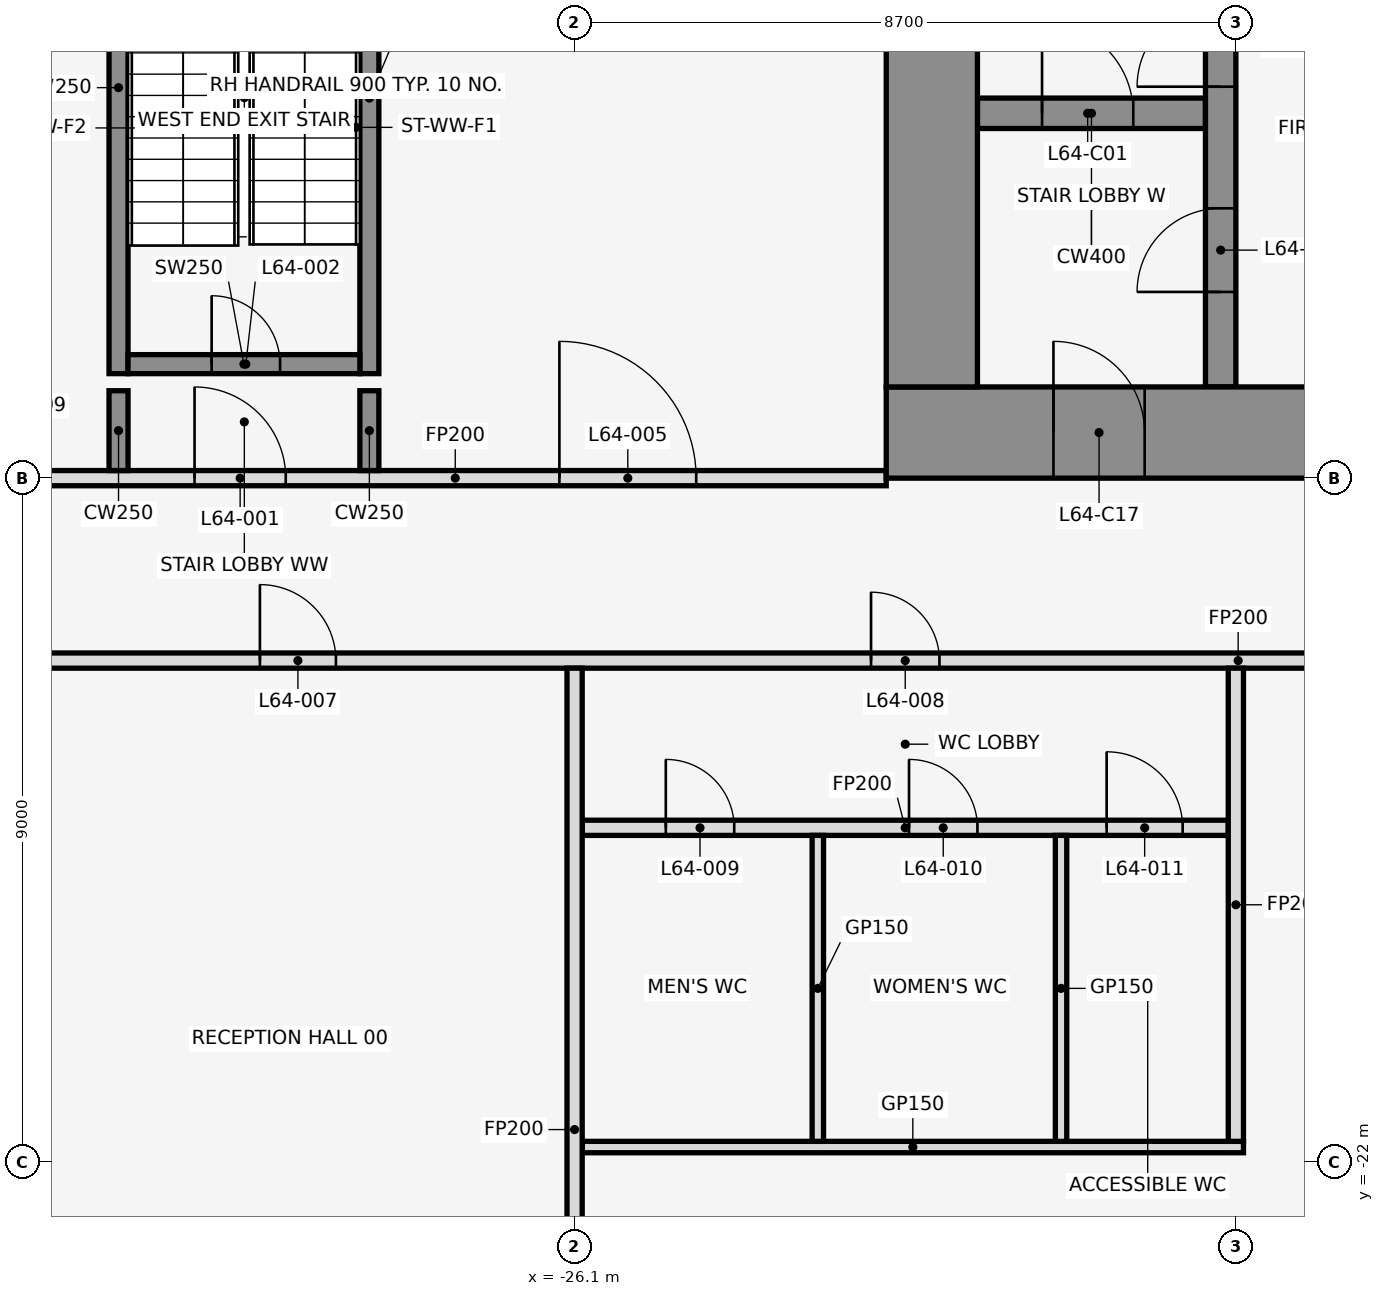
"""IFC4 building model, lengths in metres.
Left out: names, types, materials, properties, quantities, classifications, styles, units other than length and angle.
Written with IfcOpenShell. Run it as: python <this file> out.ifc"""

import sys

from ifc_helpers import new_model, si_unit, direction, frame, frame_2d, origin, place, context, subcontext, project, spatial, rectangle, extrude, element, fill, save


model = new_model("IFC4")
c1 = context("Model", 3, precision=1e-05, world=origin(), true_north=direction((0.0, 1.0)))
c2 = subcontext(c1, "Body", "Model", "MODEL_VIEW")
j1 = project(units=[si_unit("LENGTHUNIT", "METRE"), si_unit("PLANEANGLEUNIT", "RADIAN")], contexts=[c1])
p1 = place(None, origin())
s1 = spatial("IfcSite", under=j1, at=p1, CompositionType="ELEMENT")
p2 = place(p1, origin())
s2 = spatial("IfcBuilding", under=s1, at=p2, CompositionType="ELEMENT")
p3 = place(p2, frame((0.0, 0.0, 283.4)))
s3 = spatial("IfcBuildingStorey", under=s2, at=p3, CompositionType="ELEMENT", Elevation=283.4)
p4 = place(p3, frame((-32.1, -11.625, 0.0), z_axis=(0.0, 0.0, 1.0), x_axis=(0.0, 1.0, 0.0)))
e1 = element("IfcWall", 1, at=p4, inside=s3, PredefinedType="SHEAR", context=c2, shape_type="SweptSolid", body=[
    extrude(rectangle(XDim=7.525, YDim=0.25, at=frame_2d((3.762, 0.0))), origin(), (0.0, 0.0, 1.0), 4.2),
])
p5 = place(p3, frame((-28.8, -11.625, 0.0), z_axis=(0.0, 0.0, 1.0), x_axis=(0.0, 1.0, 0.0)))
e2 = element("IfcWall", 2, at=p5, inside=s3, PredefinedType="SHEAR", context=c2, shape_type="SweptSolid", body=[
    extrude(rectangle(XDim=7.25, YDim=0.25, at=frame_2d((3.625, 0.0))), origin(), (0.0, 0.0, 1.0), 4.2),
])
p6 = place(p3, frame((-31.975, -11.5, 0.0), z_axis=(0.0, 0.0, 1.0), x_axis=(1.0, 0.0, 0.0)))
e3 = element("IfcWall", 3, at=p6, inside=s3, PredefinedType="SHEAR", context=c2, shape_type="SweptSolid", body=[
    extrude(rectangle(XDim=3.05, YDim=0.25, at=frame_2d((1.525, 0.0))), origin(), (0.0, 0.0, 1.0), 4.2),
])
p7 = place(p6, frame((1.1, 0.0, 0.0)))
e4 = element("IfcOpeningElement", 4, at=p7, cuts=e3, PredefinedType="OPENING", context=c2, shape_type="SweptSolid", body=[
    extrude(rectangle(XDim=0.9, YDim=2.1, at=frame_2d((0.45, 1.05))), frame((0.0, 0.137, 0.0), z_axis=(0.0, -1.0, 0.0), x_axis=(1.0, 0.0, 0.0)), (0.0, 0.0, 1.0), 0.274),
])
p8 = place(p3, frame((-26.0, -21.8, 0.0), z_axis=(0.0, 0.0, 1.0), x_axis=(1.0, 0.0, 0.0)))
e5 = element("IfcWall", 5, at=p8, inside=s3, PredefinedType="PARTITIONING", context=c2, shape_type="SweptSolid", body=[
    extrude(rectangle(XDim=8.7, YDim=0.15, at=frame_2d((4.35, 0.0))), origin(), (0.0, 0.0, 1.0), 3.068),
])
p9 = place(p3, frame((-26.0, -17.6, 0.0), z_axis=(0.0, 0.0, 1.0), x_axis=(1.0, 0.0, 0.0)))
e6 = element("IfcWall", 6, at=p9, inside=s3, PredefinedType="PARTITIONING", context=c2, shape_type="SweptSolid", body=[
    extrude(rectangle(XDim=8.5, YDim=0.2, at=frame_2d((4.25, 0.0))), origin(), (0.0, 0.0, 1.0), 3.068),
])
p10 = place(p9, frame((1.1, 0.0, 0.0)))
e7 = element("IfcOpeningElement", 7, at=p10, cuts=e6, PredefinedType="OPENING", context=c2, shape_type="SweptSolid", body=[
    extrude(rectangle(XDim=0.9, YDim=2.1, at=frame_2d((0.45, 1.05))), frame((0.0, 0.112, 0.0), z_axis=(0.0, -1.0, 0.0), x_axis=(1.0, 0.0, 0.0)), (0.0, 0.0, 1.0), 0.224),
])
p11 = place(p9, frame((4.3, 0.0, 0.0)))
e8 = element("IfcOpeningElement", 8, at=p11, cuts=e6, PredefinedType="OPENING", context=c2, shape_type="SweptSolid", body=[
    extrude(rectangle(XDim=0.9, YDim=2.1, at=frame_2d((0.45, 1.05))), frame((0.0, 0.112, 0.0), z_axis=(0.0, -1.0, 0.0), x_axis=(1.0, 0.0, 0.0)), (0.0, 0.0, 1.0), 0.224),
])
p12 = place(p9, frame((6.9, 0.0, 0.0)))
e9 = element("IfcOpeningElement", 9, at=p12, cuts=e6, PredefinedType="OPENING", context=c2, shape_type="SweptSolid", body=[
    extrude(rectangle(XDim=1.0, YDim=2.1, at=frame_2d((0.5, 1.05))), frame((0.0, 0.112, 0.0), z_axis=(0.0, -1.0, 0.0), x_axis=(1.0, 0.0, 0.0)), (0.0, 0.0, 1.0), 0.224),
])
p13 = place(p3, frame((-33.34, -15.4, 0.0), z_axis=(0.0, 0.0, 1.0), x_axis=(1.0, 0.0, 0.0)))
e10 = element("IfcWall", 10, at=p13, inside=s3, PredefinedType="PARTITIONING", context=c2, shape_type="SweptSolid", body=[
    extrude(rectangle(XDim=31.94, YDim=0.2, at=frame_2d((15.97, 0.0))), origin(), (0.0, 0.0, 1.0), 3.068),
])
p14 = place(p13, frame((3.1, 0.0, 0.0)))
e11 = element("IfcOpeningElement", 11, at=p14, cuts=e10, PredefinedType="OPENING", context=c2, shape_type="SweptSolid", body=[
    extrude(rectangle(XDim=1.0, YDim=2.1, at=frame_2d((0.5, 1.05))), frame((0.0, 0.112, 0.0), z_axis=(0.0, -1.0, 0.0), x_axis=(1.0, 0.0, 0.0)), (0.0, 0.0, 1.0), 0.224),
])
p15 = place(p13, frame((11.14, 0.0, 0.0)))
e12 = element("IfcOpeningElement", 12, at=p15, cuts=e10, PredefinedType="OPENING", context=c2, shape_type="SweptSolid", body=[
    extrude(rectangle(XDim=0.9, YDim=2.1, at=frame_2d((0.45, 1.05))), frame((0.0, 0.112, 0.0), z_axis=(0.0, -1.0, 0.0), x_axis=(1.0, 0.0, 0.0)), (0.0, 0.0, 1.0), 0.224),
])
p16 = place(p13, frame((20.84, 0.0, 0.0)))
e13 = element("IfcOpeningElement", 13, at=p16, cuts=e10, PredefinedType="OPENING", context=c2, shape_type="SweptSolid", body=[
    extrude(rectangle(XDim=1.8, YDim=2.1, at=frame_2d((0.9, 1.05))), frame((0.0, 0.112, 0.0), z_axis=(0.0, -1.0, 0.0), x_axis=(1.0, 0.0, 0.0)), (0.0, 0.0, 1.0), 0.224),
])
p17 = place(p3, frame((-33.34, -13.0, 0.0), z_axis=(0.0, 0.0, 1.0), x_axis=(1.0, 0.0, 0.0)))
e14 = element("IfcWall", 14, at=p17, inside=s3, PredefinedType="PARTITIONING", context=c2, shape_type="SweptSolid", body=[
    extrude(rectangle(XDim=11.34, YDim=0.2, at=frame_2d((5.67, 0.0))), origin(), (0.0, 0.0, 1.0), 3.068),
])
p18 = place(p17, frame((2.24, 0.0, 0.0)))
e15 = element("IfcOpeningElement", 15, at=p18, cuts=e14, PredefinedType="OPENING", context=c2, shape_type="SweptSolid", body=[
    extrude(rectangle(XDim=1.2, YDim=2.1, at=frame_2d((0.6, 1.05))), frame((0.0, 0.112, 0.0), z_axis=(0.0, -1.0, 0.0), x_axis=(1.0, 0.0, 0.0)), (0.0, 0.0, 1.0), 0.224),
])
p19 = place(p17, frame((7.04, 0.0, 0.0)))
e16 = element("IfcOpeningElement", 16, at=p19, cuts=e14, PredefinedType="OPENING", context=c2, shape_type="SweptSolid", body=[
    extrude(rectangle(XDim=1.8, YDim=2.1, at=frame_2d((0.9, 1.05))), frame((0.0, 0.112, 0.0), z_axis=(0.0, -1.0, 0.0), x_axis=(1.0, 0.0, 0.0)), (0.0, 0.0, 1.0), 0.224),
])
for number, where, z_axis, x_axis in (
    (17, (-32.1, -12.9, 0.0), (0.0, 0.0, 1.0), (0.0, 1.0, 0.0)),
    (18, (-28.8, -12.9, 0.0), (0.0, 0.0, 1.0), (0.0, 1.0, 0.0)),
):
    element("IfcWall", number, at=place(p3, frame(where, z_axis=z_axis, x_axis=x_axis)), inside=s3, PredefinedType="SHEAR", context=c2, shape_type="SweptSolid", body=[
        extrude(rectangle(XDim=1.05, YDim=0.25, at=frame_2d((0.525, 0.0))), origin(), (0.0, 0.0, 1.0), 4.2),
    ])
p20 = place(p3, frame((-26.1, -27.64, 0.0), z_axis=(0.0, 0.0, 1.0), x_axis=(0.0, 1.0, 0.0)))
e19 = element("IfcWall", 19, at=p20, inside=s3, PredefinedType="PARTITIONING", context=c2, shape_type="SweptSolid", body=[
    extrude(rectangle(XDim=12.14, YDim=0.2, at=frame_2d((6.07, 0.0))), origin(), (0.0, 0.0, 1.0), 3.068),
])
for number, where, z_axis, x_axis in (
    (20, (-22.9, -21.725, 0.0), (0.0, 0.0, 1.0), (0.0, 1.0, 0.0)),
    (21, (-19.7, -21.725, 0.0), (0.0, 0.0, 1.0), (0.0, 1.0, 0.0)),
):
    element("IfcWall", number, at=place(p3, frame(where, z_axis=z_axis, x_axis=x_axis)), inside=s3, PredefinedType="PARTITIONING", context=c2, shape_type="SweptSolid", body=[
        extrude(rectangle(XDim=4.025, YDim=0.15, at=frame_2d((2.013, 0.0))), origin(), (0.0, 0.0, 1.0), 3.068),
    ])
p21 = place(p3, frame((-17.4, -21.725, 0.0), z_axis=(0.0, 0.0, 1.0), x_axis=(0.0, 1.0, 0.0)))
e22 = element("IfcWall", 22, at=p21, inside=s3, PredefinedType="PARTITIONING", context=c2, shape_type="SweptSolid", body=[
    extrude(rectangle(XDim=6.225, YDim=0.2, at=frame_2d((3.113, 0.0))), origin(), (0.0, 0.0, 1.0), 3.068),
])
p22 = place(p3, frame((-20.8, -8.2, 0.0), z_axis=(0.0, 0.0, 1.0), x_axis=(1.0, 0.0, 0.0)))
e23 = element("IfcWall", 23, at=p22, inside=s3, PredefinedType="SHEAR", context=c2, shape_type="SweptSolid", body=[
    extrude(rectangle(XDim=3.0, YDim=0.4, at=frame_2d((1.5, 0.0))), origin(), (0.0, 0.0, 1.0), 4.2),
])
p23 = place(p22, frame((0.85, 0.0, 0.0)))
e24 = element("IfcOpeningElement", 24, at=p23, cuts=e23, PredefinedType="OPENING", context=c2, shape_type="SweptSolid", body=[
    extrude(rectangle(XDim=1.2, YDim=2.1, at=frame_2d((0.6, 1.05))), frame((0.0, 0.212, 0.0), z_axis=(0.0, -1.0, 0.0), x_axis=(1.0, 0.0, 0.0)), (0.0, 0.0, 1.0), 0.424),
])
p24 = place(p3, frame((-17.6, -11.8, 0.0), z_axis=(0.0, 0.0, 1.0), x_axis=(0.0, 1.0, 0.0)))
e25 = element("IfcWall", 25, at=p24, inside=s3, PredefinedType="SHEAR", context=c2, shape_type="SweptSolid", body=[
    extrude(rectangle(XDim=10.6, YDim=0.4, at=frame_2d((5.3, 0.0))), origin(), (0.0, 0.0, 1.0), 4.2),
])
p25 = place(p24, frame((1.25, 0.0, 0.0)))
e26 = element("IfcOpeningElement", 26, at=p25, cuts=e25, PredefinedType="OPENING", context=c2, shape_type="SweptSolid", body=[
    extrude(rectangle(XDim=1.1, YDim=2.1, at=frame_2d((0.55, 1.05))), frame((0.0, 0.212, 0.0), z_axis=(0.0, -1.0, 0.0), x_axis=(1.0, 0.0, 0.0)), (0.0, 0.0, 1.0), 0.424),
])
p26 = place(p24, frame((3.95, 0.0, 0.0)))
e27 = element("IfcOpeningElement", 27, at=p26, cuts=e25, PredefinedType="OPENING", context=c2, shape_type="SweptSolid", body=[
    extrude(rectangle(XDim=1.1, YDim=2.1, at=frame_2d((0.55, 1.05))), frame((0.0, 0.212, 0.0), z_axis=(0.0, -1.0, 0.0), x_axis=(1.0, 0.0, 0.0)), (0.0, 0.0, 1.0), 0.424),
])
p27 = place(p3, frame((-22.0, -12.4, 0.0), z_axis=(0.0, 0.0, 1.0), x_axis=(1.0, 0.0, 0.0)))
e28 = element("IfcWall", 28, at=p27, inside=s3, PredefinedType="SHEAR", context=c2, shape_type="SweptSolid", body=[
    extrude(rectangle(XDim=44.0, YDim=1.2, at=frame_2d((22.0, 0.0))), origin(), (0.0, 0.0, 1.0), 4.2),
])
p28 = place(p27, frame((2.2, 0.0, 0.0)))
e29 = element("IfcOpeningElement", 29, at=p28, cuts=e28, PredefinedType="OPENING", context=c2, shape_type="SweptSolid", body=[
    extrude(rectangle(XDim=1.2, YDim=2.1, at=frame_2d((0.6, 1.05))), frame((0.0, 0.612, 0.0), z_axis=(0.0, -1.0, 0.0), x_axis=(1.0, 0.0, 0.0)), (0.0, 0.0, 1.0), 1.224),
])
p29 = place(p27, frame((21.4, 0.0, 0.0)))
e30 = element("IfcOpeningElement", 30, at=p29, cuts=e28, PredefinedType="OPENING", context=c2, shape_type="SweptSolid", body=[
    extrude(rectangle(XDim=1.2, YDim=2.1, at=frame_2d((0.6, 1.05))), frame((0.0, 0.612, 0.0), z_axis=(0.0, -1.0, 0.0), x_axis=(1.0, 0.0, 0.0)), (0.0, 0.0, 1.0), 1.224),
])
p30 = place(p27, frame((40.6, 0.0, 0.0)))
e31 = element("IfcOpeningElement", 31, at=p30, cuts=e28, PredefinedType="OPENING", context=c2, shape_type="SweptSolid", body=[
    extrude(rectangle(XDim=1.2, YDim=2.1, at=frame_2d((0.6, 1.05))), frame((0.0, 0.612, 0.0), z_axis=(0.0, -1.0, 0.0), x_axis=(1.0, 0.0, 0.0)), (0.0, 0.0, 1.0), 1.224),
])
p31 = place(p27, frame((16.0, 0.0, 0.0)))
e32 = element("IfcOpeningElement", 32, at=p31, cuts=e28, PredefinedType="OPENING", context=c2, shape_type="SweptSolid", body=[
    extrude(rectangle(XDim=1.8, YDim=2.1, at=frame_2d((0.9, 1.05))), frame((0.0, 0.612, 0.0), z_axis=(0.0, -1.0, 0.0), x_axis=(1.0, 0.0, 0.0)), (0.0, 0.0, 1.0), 1.224),
])
p32 = place(p27, frame((6.3, 0.0, 0.0)))
e33 = element("IfcOpeningElement", 33, at=p32, cuts=e28, PredefinedType="OPENING", context=c2, shape_type="SweptSolid", body=[
    extrude(rectangle(XDim=1.2, YDim=2.1, at=frame_2d((0.6, 1.05))), frame((0.0, 0.612, 0.0), z_axis=(0.0, -1.0, 0.0), x_axis=(1.0, 0.0, 0.0)), (0.0, 0.0, 1.0), 1.224),
])
p33 = place(p27, frame((26.2, 0.0, 0.0)))
e34 = element("IfcOpeningElement", 34, at=p33, cuts=e28, PredefinedType="OPENING", context=c2, shape_type="SweptSolid", body=[
    extrude(rectangle(XDim=1.8, YDim=2.1, at=frame_2d((0.9, 1.05))), frame((0.0, 0.612, 0.0), z_axis=(0.0, -1.0, 0.0), x_axis=(1.0, 0.0, 0.0)), (0.0, 0.0, 1.0), 1.224),
])
p34 = place(p27, frame((36.5, 0.0, 0.0)))
e35 = element("IfcOpeningElement", 35, at=p34, cuts=e28, PredefinedType="OPENING", context=c2, shape_type="SweptSolid", body=[
    extrude(rectangle(XDim=1.2, YDim=2.1, at=frame_2d((0.6, 1.05))), frame((0.0, 0.612, 0.0), z_axis=(0.0, -1.0, 0.0), x_axis=(1.0, 0.0, 0.0)), (0.0, 0.0, 1.0), 1.224),
])
p35 = place(p3, frame((-21.4, -11.8, 0.0), z_axis=(0.0, 0.0, 1.0), x_axis=(0.0, 1.0, 0.0)))
e36 = element("IfcWall", 36, at=p35, inside=s3, PredefinedType="SHEAR", context=c2, shape_type="SweptSolid", body=[
    extrude(rectangle(XDim=10.6, YDim=1.2, at=frame_2d((5.3, 0.0))), origin(), (0.0, 0.0, 1.0), 4.2),
])
p36 = place(p18, origin())
e37 = element("IfcDoor", 37, at=p36, inside=s3, OperationType="SINGLE_SWING_LEFT", PredefinedType="DOOR", context=c2, shape_type="SweptSolid", body=[
    extrude(rectangle(XDim=1.2, YDim=2.1, at=frame_2d((0.6, 1.05))), frame((0.0, 0.025, 0.0), z_axis=(0.0, -1.0, 0.0), x_axis=(1.0, 0.0, 0.0)), (0.0, 0.0, 1.0), 0.05),
])
fill(e15, e37)
p37 = place(p7, origin())
e38 = element("IfcDoor", 38, at=p37, inside=s3, OperationType="SINGLE_SWING_LEFT", PredefinedType="DOOR", context=c2, shape_type="SweptSolid", body=[
    extrude(rectangle(XDim=0.9, YDim=2.1, at=frame_2d((0.45, 1.05))), frame((0.0, 0.025, 0.0), z_axis=(0.0, -1.0, 0.0), x_axis=(1.0, 0.0, 0.0)), (0.0, 0.0, 1.0), 0.05),
])
fill(e4, e38)
p38 = place(p19, origin())
e39 = element("IfcDoor", 39, at=p38, inside=s3, OperationType="SINGLE_SWING_LEFT", PredefinedType="DOOR", context=c2, shape_type="SweptSolid", body=[
    extrude(rectangle(XDim=1.8, YDim=2.1, at=frame_2d((0.9, 1.05))), frame((0.0, 0.025, 0.0), z_axis=(0.0, -1.0, 0.0), x_axis=(1.0, 0.0, 0.0)), (0.0, 0.0, 1.0), 0.05),
])
fill(e16, e39)
p39 = place(p14, frame((1.0, 0.0, 0.0), z_axis=(0.0, 0.0, 1.0), x_axis=(-1.0, 0.0, 0.0)))
e40 = element("IfcDoor", 40, at=p39, inside=s3, OperationType="SINGLE_SWING_LEFT", PredefinedType="DOOR", context=c2, shape_type="SweptSolid", body=[
    extrude(rectangle(XDim=1.0, YDim=2.1, at=frame_2d((0.5, 1.05))), frame((0.0, 0.025, 0.0), z_axis=(0.0, -1.0, 0.0), x_axis=(1.0, 0.0, 0.0)), (0.0, 0.0, 1.0), 0.05),
])
fill(e11, e40)
p40 = place(p15, frame((0.9, 0.0, 0.0), z_axis=(0.0, 0.0, 1.0), x_axis=(-1.0, 0.0, 0.0)))
e41 = element("IfcDoor", 41, at=p40, inside=s3, OperationType="SINGLE_SWING_RIGHT", PredefinedType="DOOR", context=c2, shape_type="SweptSolid", body=[
    extrude(rectangle(XDim=0.9, YDim=2.1, at=frame_2d((0.45, 1.05))), frame((0.0, 0.025, 0.0), z_axis=(0.0, -1.0, 0.0), x_axis=(1.0, 0.0, 0.0)), (0.0, 0.0, 1.0), 0.05),
])
fill(e12, e41)
p41 = place(p10, frame((0.9, 0.0, 0.0), z_axis=(0.0, 0.0, 1.0), x_axis=(-1.0, 0.0, 0.0)))
e42 = element("IfcDoor", 42, at=p41, inside=s3, OperationType="SINGLE_SWING_RIGHT", PredefinedType="DOOR", context=c2, shape_type="SweptSolid", body=[
    extrude(rectangle(XDim=0.9, YDim=2.1, at=frame_2d((0.45, 1.05))), frame((0.0, 0.025, 0.0), z_axis=(0.0, -1.0, 0.0), x_axis=(1.0, 0.0, 0.0)), (0.0, 0.0, 1.0), 0.05),
])
fill(e7, e42)
p42 = place(p11, frame((0.9, 0.0, 0.0), z_axis=(0.0, 0.0, 1.0), x_axis=(-1.0, 0.0, 0.0)))
e43 = element("IfcDoor", 43, at=p42, inside=s3, OperationType="SINGLE_SWING_LEFT", PredefinedType="DOOR", context=c2, shape_type="SweptSolid", body=[
    extrude(rectangle(XDim=0.9, YDim=2.1, at=frame_2d((0.45, 1.05))), frame((0.0, 0.025, 0.0), z_axis=(0.0, -1.0, 0.0), x_axis=(1.0, 0.0, 0.0)), (0.0, 0.0, 1.0), 0.05),
])
fill(e8, e43)
p43 = place(p12, frame((1.0, 0.0, 0.0), z_axis=(0.0, 0.0, 1.0), x_axis=(-1.0, 0.0, 0.0)))
e44 = element("IfcDoor", 44, at=p43, inside=s3, OperationType="SINGLE_SWING_RIGHT", PredefinedType="DOOR", context=c2, shape_type="SweptSolid", body=[
    extrude(rectangle(XDim=1.0, YDim=2.1, at=frame_2d((0.5, 1.05))), frame((0.0, 0.025, 0.0), z_axis=(0.0, -1.0, 0.0), x_axis=(1.0, 0.0, 0.0)), (0.0, 0.0, 1.0), 0.05),
])
fill(e9, e44)
p44 = place(p23, origin())
e45 = element("IfcDoor", 45, at=p44, inside=s3, OperationType="SINGLE_SWING_LEFT", PredefinedType="DOOR", context=c2, shape_type="SweptSolid", body=[
    extrude(rectangle(XDim=1.2, YDim=2.1, at=frame_2d((0.6, 1.05))), frame((0.0, 0.025, 0.0), z_axis=(0.0, -1.0, 0.0), x_axis=(1.0, 0.0, 0.0)), (0.0, 0.0, 1.0), 0.05),
])
fill(e24, e45)
p45 = place(p25, frame((1.1, 0.0, 0.0), z_axis=(0.0, 0.0, 1.0), x_axis=(-1.0, 0.0, 0.0)))
e46 = element("IfcDoor", 46, at=p45, inside=s3, OperationType="SINGLE_SWING_LEFT", PredefinedType="DOOR", context=c2, shape_type="SweptSolid", body=[
    extrude(rectangle(XDim=1.1, YDim=2.1, at=frame_2d((0.55, 1.05))), frame((0.0, 0.025, 0.0), z_axis=(0.0, -1.0, 0.0), x_axis=(1.0, 0.0, 0.0)), (0.0, 0.0, 1.0), 0.05),
])
fill(e26, e46)
p46 = place(p26, frame((1.1, 0.0, 0.0), z_axis=(0.0, 0.0, 1.0), x_axis=(-1.0, 0.0, 0.0)))
e47 = element("IfcDoor", 47, at=p46, inside=s3, OperationType="SINGLE_SWING_LEFT", PredefinedType="DOOR", context=c2, shape_type="SweptSolid", body=[
    extrude(rectangle(XDim=1.1, YDim=2.1, at=frame_2d((0.55, 1.05))), frame((0.0, 0.025, 0.0), z_axis=(0.0, -1.0, 0.0), x_axis=(1.0, 0.0, 0.0)), (0.0, 0.0, 1.0), 0.05),
])
fill(e27, e47)
p47 = place(p28, frame((1.2, 0.0, 0.0), z_axis=(0.0, 0.0, 1.0), x_axis=(-1.0, 0.0, 0.0)))
e48 = element("IfcDoor", 48, at=p47, inside=s3, OperationType="SINGLE_SWING_RIGHT", PredefinedType="DOOR", context=c2, shape_type="SweptSolid", body=[
    extrude(rectangle(XDim=1.2, YDim=2.1, at=frame_2d((0.6, 1.05))), frame((0.0, 0.025, 0.0), z_axis=(0.0, -1.0, 0.0), x_axis=(1.0, 0.0, 0.0)), (0.0, 0.0, 1.0), 0.05),
])
fill(e29, e48)
save(model, sys.argv[1])
